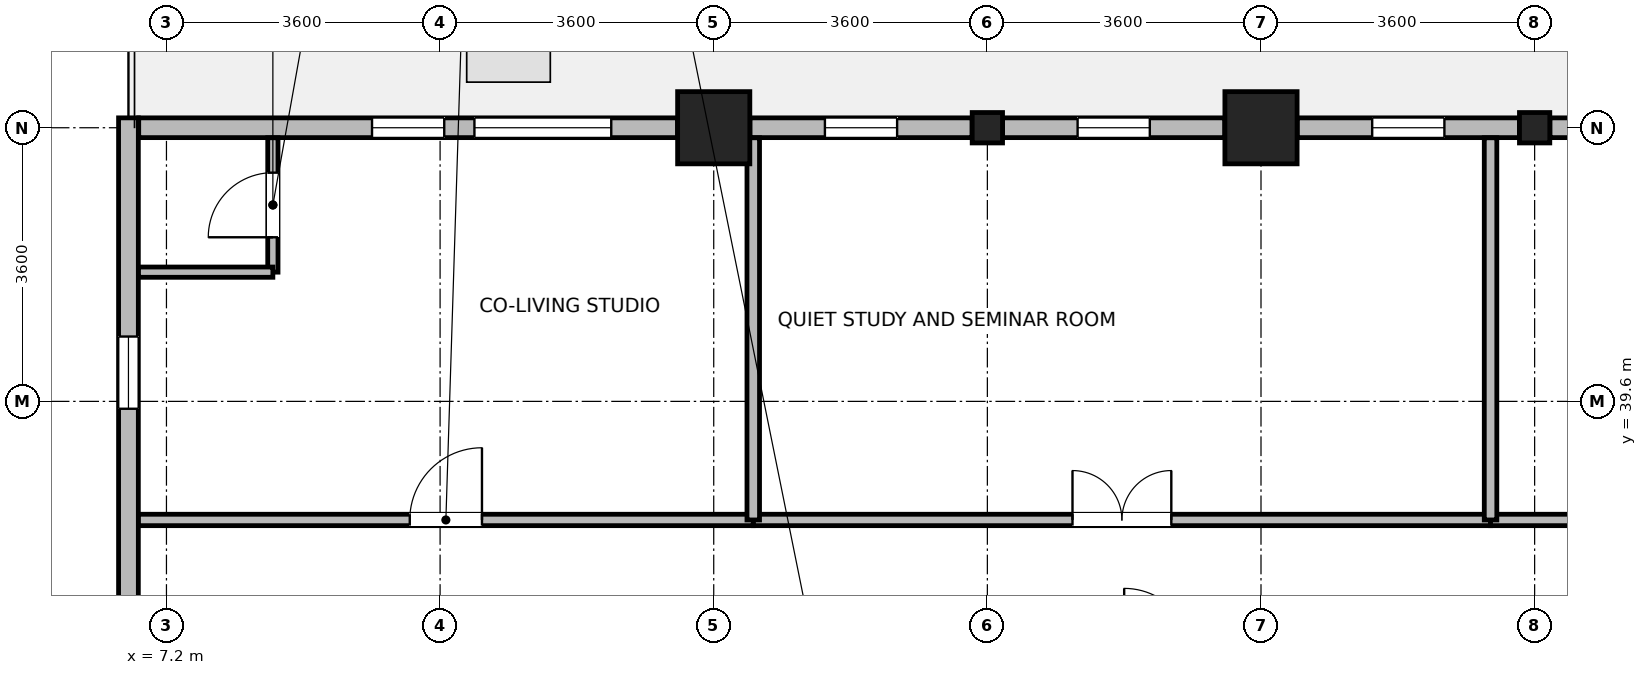
"""IFC4 building model, lengths in metres.
Left out: names, types, materials, properties, quantities, classifications, styles, units other than length and angle.
Written with IfcOpenShell. Run it as: python <this file> out.ifc"""

import sys

from ifc_helpers import new_model, si_unit, direction, frame, frame_2d, origin, origin_2d, place, context, subcontext, project, spatial, rectangle, i_section, extrude, source, transform, mapped, element, fill, save


model = new_model("IFC4")
c1 = context("Model", 3, precision=1e-05, world=origin(), true_north=direction((0.0, 1.0)))
c2 = subcontext(c1, "Body", "Model", "MODEL_VIEW")
j1 = project(units=[si_unit("LENGTHUNIT", "METRE"), si_unit("PLANEANGLEUNIT", "RADIAN")], contexts=[c1])
p1 = place(None, origin())
s1 = spatial("IfcSite", under=j1, at=p1, CompositionType="ELEMENT")
p2 = place(p1, origin())
s2 = spatial("IfcBuilding", under=s1, at=p2, CompositionType="ELEMENT")
p3 = place(p2, frame((0.0, 0.0, 212.9)))
s3 = spatial("IfcBuildingStorey", under=s2, at=p3, CompositionType="ELEMENT", Elevation=212.9)
m1 = source(origin(), c2, "Body", "SweptSolid", [
    extrude(rectangle(XDim=0.95, YDim=0.95, at=origin_2d()), origin(), (0.0, 0.0, 1.0), 3.7),
])
for number, where, z_axis, x_axis in (
    (1, (14.4, 43.2, 0.0), (0.0, 0.0, 1.0), (1.0, 0.0, 0.0)),
    (2, (21.6, 43.2, 0.0), (0.0, 0.0, 1.0), (1.0, 0.0, 0.0)),
):
    element("IfcColumn", number, at=place(p3, frame(where, z_axis=z_axis, x_axis=x_axis)), inside=s3, PredefinedType="COLUMN", context=c2, shape_type="MappedRepresentation", body=[
        mapped(m1, transform((0.0, 0.0, 0.0), x_axis=(1.0, 0.0, 0.0), y_axis=(0.0, 1.0, 0.0), z_axis=(0.0, 0.0, 1.0), scale=1.0)),
    ])
m2 = source(origin(), c2, "Body", "SweptSolid", [
    extrude(i_section(OverallWidth=0.399, OverallDepth=0.4, WebThickness=0.017, FlangeThickness=0.023, FilletRadius=0.015, at=origin_2d()), origin(), (0.0, 0.0, 1.0), 3.7),
])
for number, where, z_axis, x_axis in (
    (3, (18.0, 43.2, 0.0), (0.0, 0.0, 1.0), (1.0, 0.0, 0.0)),
    (4, (25.2, 43.2, 0.0), (0.0, 0.0, 1.0), (1.0, 0.0, 0.0)),
):
    element("IfcColumn", number, at=place(p3, frame(where, z_axis=z_axis, x_axis=x_axis)), inside=s3, PredefinedType="COLUMN", context=c2, shape_type="MappedRepresentation", body=[
        mapped(m2, transform((0.0, 0.0, 0.0), x_axis=(1.0, 0.0, 0.0), y_axis=(0.0, 1.0, 0.0), z_axis=(0.0, 0.0, 1.0), scale=1.0)),
    ])
p4 = place(p3, frame((25.4, 43.2, 0.0), z_axis=(0.0, 0.0, 1.0), x_axis=(1.0, 0.0, 0.0)))
e5 = element("IfcWall", 5, at=p4, inside=s3, PredefinedType="STANDARD", context=c2, shape_type="SweptSolid", body=[
    extrude(rectangle(XDim=2.924, YDim=0.26, at=frame_2d((1.462, 0.0))), origin(), (0.0, 0.0, 1.0), 3.05),
])
p5 = place(p4, frame((0.987, 0.0, 0.85)))
e6 = element("IfcOpeningElement", 6, at=p5, cuts=e5, PredefinedType="OPENING", context=c2, shape_type="SweptSolid", body=[
    extrude(rectangle(XDim=0.95, YDim=1.75, at=frame_2d((0.475, 0.875))), frame((0.0, 0.14, 0.0), z_axis=(0.0, -1.0, 0.0), x_axis=(1.0, 0.0, 0.0)), (0.0, 0.0, 1.0), 0.28),
])
p6 = place(p3, frame((22.076, 43.2, 0.0), z_axis=(0.0, 0.0, 1.0), x_axis=(1.0, 0.0, 0.0)))
e7 = element("IfcWall", 7, at=p6, inside=s3, PredefinedType="STANDARD", context=c2, shape_type="SweptSolid", body=[
    extrude(rectangle(XDim=2.924, YDim=0.26, at=frame_2d((1.462, 0.0))), origin(), (0.0, 0.0, 1.0), 3.05),
])
p7 = place(p6, frame((0.987, 0.0, 0.85)))
e8 = element("IfcOpeningElement", 8, at=p7, cuts=e7, PredefinedType="OPENING", context=c2, shape_type="SweptSolid", body=[
    extrude(rectangle(XDim=0.95, YDim=1.75, at=frame_2d((0.475, 0.875))), frame((0.0, 0.14, 0.0), z_axis=(0.0, -1.0, 0.0), x_axis=(1.0, 0.0, 0.0)), (0.0, 0.0, 1.0), 0.28),
])
p8 = place(p3, frame((18.2, 43.2, 0.0), z_axis=(0.0, 0.0, 1.0), x_axis=(1.0, 0.0, 0.0)))
e9 = element("IfcWall", 9, at=p8, inside=s3, PredefinedType="STANDARD", context=c2, shape_type="SweptSolid", body=[
    extrude(rectangle(XDim=2.924, YDim=0.26, at=frame_2d((1.462, 0.0))), origin(), (0.0, 0.0, 1.0), 3.05),
])
p9 = place(p8, frame((0.987, 0.0, 0.85)))
e10 = element("IfcOpeningElement", 10, at=p9, cuts=e9, PredefinedType="OPENING", context=c2, shape_type="SweptSolid", body=[
    extrude(rectangle(XDim=0.95, YDim=1.75, at=frame_2d((0.475, 0.875))), frame((0.0, 0.14, 0.0), z_axis=(0.0, -1.0, 0.0), x_axis=(1.0, 0.0, 0.0)), (0.0, 0.0, 1.0), 0.28),
])
p10 = place(p3, frame((14.876, 43.2, 0.0), z_axis=(0.0, 0.0, 1.0), x_axis=(1.0, 0.0, 0.0)))
e11 = element("IfcWall", 11, at=p10, inside=s3, PredefinedType="STANDARD", context=c2, shape_type="SweptSolid", body=[
    extrude(rectangle(XDim=2.924, YDim=0.26, at=frame_2d((1.462, 0.0))), origin(), (0.0, 0.0, 1.0), 3.05),
])
p11 = place(p10, frame((0.987, 0.0, 0.85)))
e12 = element("IfcOpeningElement", 12, at=p11, cuts=e11, PredefinedType="OPENING", context=c2, shape_type="SweptSolid", body=[
    extrude(rectangle(XDim=0.95, YDim=1.75, at=frame_2d((0.475, 0.875))), frame((0.0, 0.14, 0.0), z_axis=(0.0, -1.0, 0.0), x_axis=(1.0, 0.0, 0.0)), (0.0, 0.0, 1.0), 0.28),
])
p12 = place(p3, frame((6.835, 43.2, 0.0), z_axis=(0.0, 0.0, 1.0), x_axis=(1.0, 0.0, 0.0)))
e13 = element("IfcWall", 13, at=p12, inside=s3, PredefinedType="STANDARD", context=c2, shape_type="SweptSolid", body=[
    extrude(rectangle(XDim=7.089, YDim=0.26, at=frame_2d((3.544, 0.0))), origin(), (0.0, 0.0, 1.0), 3.45),
])
p13 = place(p12, frame((4.417, 0.0, 0.85)))
e14 = element("IfcOpeningElement", 14, at=p13, cuts=e13, PredefinedType="OPENING", context=c2, shape_type="SweptSolid", body=[
    extrude(rectangle(XDim=1.8, YDim=1.85, at=frame_2d((0.9, 0.925))), frame((0.0, 0.14, 0.0), z_axis=(0.0, -1.0, 0.0), x_axis=(1.0, 0.0, 0.0)), (0.0, 0.0, 1.0), 0.28),
])
p14 = place(p12, frame((3.07, 0.0, 0.85)))
e15 = element("IfcOpeningElement", 15, at=p14, cuts=e13, PredefinedType="OPENING", context=c2, shape_type="SweptSolid", body=[
    extrude(rectangle(XDim=0.95, YDim=1.75, at=frame_2d((0.475, 0.875))), frame((0.0, 0.14, 0.0), z_axis=(0.0, -1.0, 0.0), x_axis=(1.0, 0.0, 0.0)), (0.0, 0.0, 1.0), 0.28),
])
p15 = place(p3, frame((6.7, 36.626, 0.0), z_axis=(0.0, 0.0, 1.0), x_axis=(0.0, 1.0, 0.0)))
e16 = element("IfcWall", 16, at=p15, inside=s3, PredefinedType="STANDARD", context=c2, shape_type="SweptSolid", body=[
    extrude(rectangle(XDim=6.704, YDim=0.26, at=frame_2d((3.352, 0.0))), origin(), (0.0, 0.0, 1.0), 3.45),
])
p16 = place(p15, frame((2.877, 0.0, 0.85)))
e17 = element("IfcOpeningElement", 17, at=p16, cuts=e16, PredefinedType="OPENING", context=c2, shape_type="SweptSolid", body=[
    extrude(rectangle(XDim=0.95, YDim=1.75, at=frame_2d((0.475, 0.875))), frame((0.0, 0.14, 0.0), z_axis=(0.0, -1.0, 0.0), x_axis=(1.0, 0.0, 0.0)), (0.0, 0.0, 1.0), 0.28),
])
p17 = place(p3, frame((8.6, 41.3, 0.0), z_axis=(0.0, 0.0, 1.0), x_axis=(0.0, 1.0, 0.0)))
e18 = element("IfcWall", 18, at=p17, inside=s3, PredefinedType="PARTITIONING", context=c2, shape_type="SweptSolid", body=[
    extrude(rectangle(XDim=1.768, YDim=0.135, at=frame_2d((0.884, 0.0))), origin(), (0.0, 0.0, 1.0), 3.45),
])
p18 = place(p17, frame((0.459, 0.0, 0.0)))
e19 = element("IfcOpeningElement", 19, at=p18, cuts=e18, PredefinedType="OPENING", context=c2, shape_type="SweptSolid", body=[
    extrude(rectangle(XDim=0.85, YDim=2.04, at=frame_2d((0.425, 1.02))), frame((0.0, 0.078, 0.0), z_axis=(0.0, -1.0, 0.0), x_axis=(1.0, 0.0, 0.0)), (0.0, 0.0, 1.0), 0.155),
])
p19 = place(p3, frame((6.832, 41.3, 0.0), z_axis=(0.0, 0.0, 1.0), x_axis=(1.0, 0.0, 0.0)))
e20 = element("IfcWall", 20, at=p19, inside=s3, PredefinedType="PARTITIONING", context=c2, shape_type="SweptSolid", body=[
    extrude(rectangle(XDim=1.768, YDim=0.135, at=frame_2d((0.884, 0.0))), origin(), (0.0, 0.0, 1.0), 3.45),
])
p20 = place(p3, frame((14.92, 38.04, 0.0), z_axis=(0.0, 0.0, 1.0), x_axis=(1.0, 0.0, 0.0)))
e21 = element("IfcWall", 21, at=p20, inside=s3, PredefinedType="PARTITIONING", context=c2, shape_type="SweptSolid", body=[
    extrude(rectangle(XDim=9.7, YDim=0.15, at=frame_2d((4.85, 0.0))), origin(), (0.0, 0.0, 1.0), 3.45),
])
p21 = place(p20, frame((4.2, 0.0, 0.0)))
e22 = element("IfcOpeningElement", 22, at=p21, cuts=e21, PredefinedType="OPENING", context=c2, shape_type="SweptSolid", body=[
    extrude(rectangle(XDim=1.3, YDim=2.12, at=frame_2d((0.65, 1.06))), frame((0.0, 0.085, 0.0), z_axis=(0.0, -1.0, 0.0), x_axis=(1.0, 0.0, 0.0)), (0.0, 0.0, 1.0), 0.17),
])
p22 = place(p3, frame((24.62, 38.04, 0.0), z_axis=(0.0, 0.0, 1.0), x_axis=(1.0, 0.0, 0.0)))
e23 = element("IfcWall", 23, at=p22, inside=s3, PredefinedType="PARTITIONING", context=c2, shape_type="SweptSolid", body=[
    extrude(rectangle(XDim=9.02, YDim=0.15, at=frame_2d((4.51, 0.0))), origin(), (0.0, 0.0, 1.0), 3.45),
])
p23 = place(p22, frame((3.86, 0.0, 0.0)))
e24 = element("IfcOpeningElement", 24, at=p23, cuts=e23, PredefinedType="OPENING", context=c2, shape_type="SweptSolid", body=[
    extrude(rectangle(XDim=1.3, YDim=2.12, at=frame_2d((0.65, 1.06))), frame((0.0, 0.085, 0.0), z_axis=(0.0, -1.0, 0.0), x_axis=(1.0, 0.0, 0.0)), (0.0, 0.0, 1.0), 0.17),
])
p24 = place(p3, frame((6.832, 38.04, 0.0), z_axis=(0.0, 0.0, 1.0), x_axis=(1.0, 0.0, 0.0)))
e25 = element("IfcWall", 25, at=p24, inside=s3, PredefinedType="PARTITIONING", context=c2, shape_type="SweptSolid", body=[
    extrude(rectangle(XDim=8.088, YDim=0.15, at=frame_2d((4.044, 0.0))), origin(), (0.0, 0.0, 1.0), 3.45),
])
p25 = place(p24, frame((3.569, 0.0, 0.0)))
e26 = element("IfcOpeningElement", 26, at=p25, cuts=e25, PredefinedType="OPENING", context=c2, shape_type="SweptSolid", body=[
    extrude(rectangle(XDim=0.95, YDim=2.1, at=frame_2d((0.475, 1.05))), frame((0.0, 0.085, 0.0), z_axis=(0.0, -1.0, 0.0), x_axis=(1.0, 0.0, 0.0)), (0.0, 0.0, 1.0), 0.17),
])
for number, where, z_axis, x_axis in (
    (27, (14.92, 38.04, 0.0), (0.0, 0.0, 1.0), (0.0, 1.0, 0.0)),
    (28, (24.62, 38.04, 0.0), (0.0, 0.0, 1.0), (0.0, 1.0, 0.0)),
):
    element("IfcWall", number, at=place(p3, frame(where, z_axis=z_axis, x_axis=x_axis)), inside=s3, PredefinedType="PARTITIONING", context=c2, shape_type="SweptSolid", body=[
        extrude(rectangle(XDim=5.028, YDim=0.165, at=frame_2d((2.514, 0.0))), origin(), (0.0, 0.0, 1.0), 3.45),
    ])
p26 = place(p7, origin())
e29 = element("IfcWindow", 29, at=p26, inside=s3, PartitioningType="SINGLE_PANEL", PredefinedType="WINDOW", context=c2, shape_type="SweptSolid", body=[
    extrude(rectangle(XDim=0.95, YDim=1.75, at=frame_2d((0.475, 0.875))), frame((0.0, 0.03, 0.0), z_axis=(0.0, -1.0, 0.0), x_axis=(1.0, 0.0, 0.0)), (0.0, 0.0, 1.0), 0.06),
])
fill(e8, e29)
p27 = place(p9, origin())
e30 = element("IfcWindow", 30, at=p27, inside=s3, PartitioningType="SINGLE_PANEL", PredefinedType="WINDOW", context=c2, shape_type="SweptSolid", body=[
    extrude(rectangle(XDim=0.95, YDim=1.75, at=frame_2d((0.475, 0.875))), frame((0.0, 0.03, 0.0), z_axis=(0.0, -1.0, 0.0), x_axis=(1.0, 0.0, 0.0)), (0.0, 0.0, 1.0), 0.06),
])
fill(e10, e30)
p28 = place(p11, origin())
e31 = element("IfcWindow", 31, at=p28, inside=s3, PartitioningType="SINGLE_PANEL", PredefinedType="WINDOW", context=c2, shape_type="SweptSolid", body=[
    extrude(rectangle(XDim=0.95, YDim=1.75, at=frame_2d((0.475, 0.875))), frame((0.0, 0.03, 0.0), z_axis=(0.0, -1.0, 0.0), x_axis=(1.0, 0.0, 0.0)), (0.0, 0.0, 1.0), 0.06),
])
fill(e12, e31)
p29 = place(p13, origin())
e32 = element("IfcWindow", 32, at=p29, inside=s3, PartitioningType="SINGLE_PANEL", PredefinedType="WINDOW", context=c2, shape_type="SweptSolid", body=[
    extrude(rectangle(XDim=1.8, YDim=1.85, at=frame_2d((0.9, 0.925))), frame((0.0, 0.03, 0.0), z_axis=(0.0, -1.0, 0.0), x_axis=(1.0, 0.0, 0.0)), (0.0, 0.0, 1.0), 0.06),
])
fill(e14, e32)
p30 = place(p14, origin())
e33 = element("IfcWindow", 33, at=p30, inside=s3, PartitioningType="SINGLE_PANEL", PredefinedType="WINDOW", context=c2, shape_type="SweptSolid", body=[
    extrude(rectangle(XDim=0.95, YDim=1.75, at=frame_2d((0.475, 0.875))), frame((0.0, 0.03, 0.0), z_axis=(0.0, -1.0, 0.0), x_axis=(1.0, 0.0, 0.0)), (0.0, 0.0, 1.0), 0.06),
])
fill(e15, e33)
p31 = place(p16, origin())
e34 = element("IfcWindow", 34, at=p31, inside=s3, PartitioningType="SINGLE_PANEL", PredefinedType="WINDOW", context=c2, shape_type="SweptSolid", body=[
    extrude(rectangle(XDim=0.95, YDim=1.75, at=frame_2d((0.475, 0.875))), frame((0.0, 0.03, 0.0), z_axis=(0.0, -1.0, 0.0), x_axis=(1.0, 0.0, 0.0)), (0.0, 0.0, 1.0), 0.06),
])
fill(e17, e34)
p32 = place(p18, origin())
e35 = element("IfcDoor", 35, at=p32, inside=s3, OperationType="SINGLE_SWING_LEFT", PredefinedType="DOOR", context=c2, shape_type="SweptSolid", body=[
    extrude(rectangle(XDim=0.85, YDim=2.04, at=frame_2d((0.425, 1.02))), frame((0.0, 0.025, 0.0), z_axis=(0.0, -1.0, 0.0), x_axis=(1.0, 0.0, 0.0)), (0.0, 0.0, 1.0), 0.05),
])
fill(e19, e35)
p33 = place(p21, origin())
e36 = element("IfcDoor", 36, at=p33, inside=s3, OperationType="DOUBLE_DOOR_SINGLE_SWING", PredefinedType="DOOR", context=c2, shape_type="SweptSolid", body=[
    extrude(rectangle(XDim=1.3, YDim=2.12, at=frame_2d((0.65, 1.06))), frame((0.0, 0.025, 0.0), z_axis=(0.0, -1.0, 0.0), x_axis=(1.0, 0.0, 0.0)), (0.0, 0.0, 1.0), 0.05),
])
fill(e22, e36)
p34 = place(p25, origin())
e37 = element("IfcDoor", 37, at=p34, inside=s3, OperationType="SINGLE_SWING_RIGHT", PredefinedType="DOOR", context=c2, shape_type="SweptSolid", body=[
    extrude(rectangle(XDim=0.95, YDim=2.1, at=frame_2d((0.475, 1.05))), frame((0.0, 0.025, 0.0), z_axis=(0.0, -1.0, 0.0), x_axis=(1.0, 0.0, 0.0)), (0.0, 0.0, 1.0), 0.05),
])
fill(e26, e37)
save(model, sys.argv[1])
